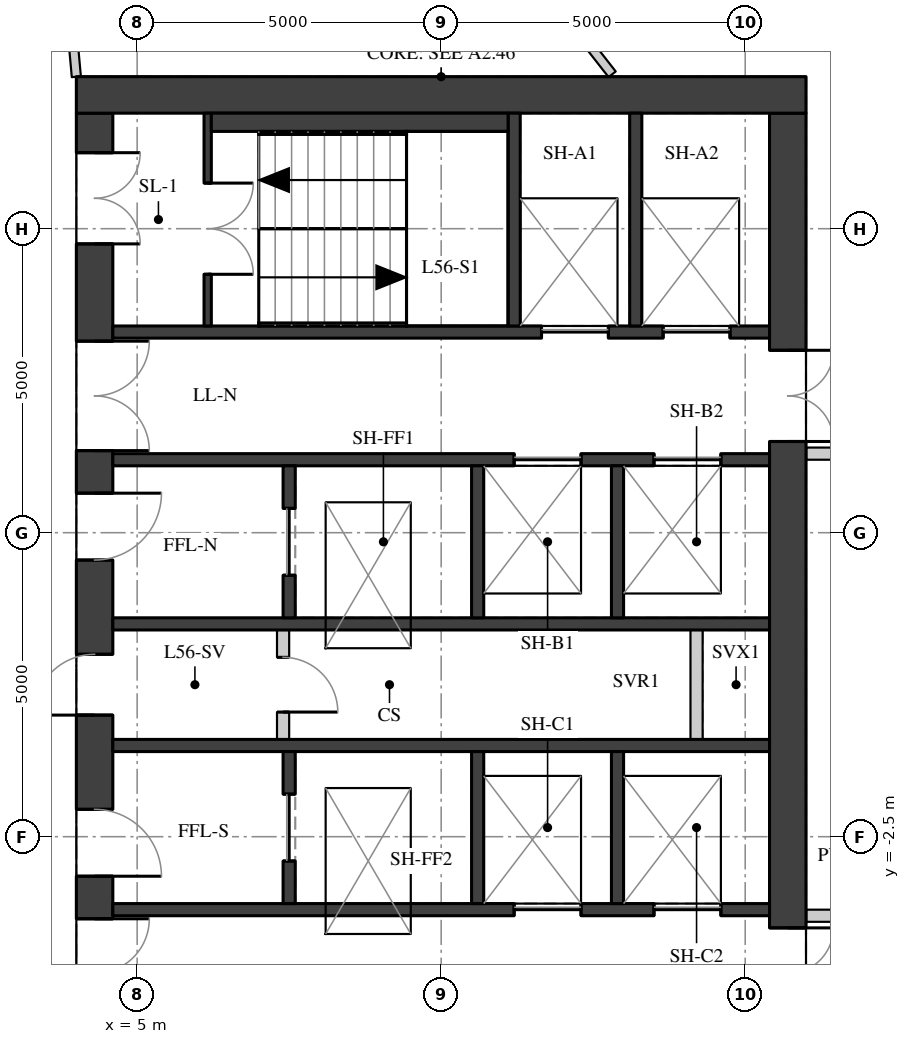
"""IFC4 building model, lengths in metres.
Left out: names, types, materials, properties, quantities, classifications, styles, units other than length and angle.
Written with IfcOpenShell. Run it as: python <this file> out.ifc"""

import sys

from ifc_helpers import new_model, si_unit, direction, frame, frame_2d, origin, place, context, subcontext, project, spatial, rectangle, extrude, element, fill, save


model = new_model("IFC4")
c1 = context("Model", 3, precision=1e-05, world=origin(), true_north=direction((0.0, 1.0)))
c2 = subcontext(c1, "Body", "Model", "MODEL_VIEW")
j1 = project(units=[si_unit("LENGTHUNIT", "METRE"), si_unit("PLANEANGLEUNIT", "RADIAN")], contexts=[c1])
p1 = place(None, origin())
s1 = spatial("IfcSite", under=j1, at=p1, CompositionType="ELEMENT")
p2 = place(p1, origin())
s2 = spatial("IfcBuilding", under=s1, at=p2, CompositionType="ELEMENT")
p3 = place(p2, frame((0.0, 0.0, 199.1)))
s3 = spatial("IfcBuildingStorey", under=s2, at=p3, CompositionType="ELEMENT", Elevation=199.1)
p4 = place(p3, frame((4.3, -9.4, 0.0), z_axis=(0.0, 0.0, 1.0), x_axis=(0.0, 1.0, 0.0)))
e1 = element("IfcWall", 1, at=p4, inside=s3, PredefinedType="SHEAR", context=c2, shape_type="SweptSolid", body=[
    extrude(rectangle(XDim=18.8, YDim=0.6, at=frame_2d((9.4, 0.0))), origin(), (0.0, 0.0, 1.0), 3.02),
])
p5 = place(p4, frame((0.65, 0.0, 0.0)))
e2 = element("IfcOpeningElement", 2, at=p5, cuts=e1, PredefinedType="OPENING", context=c2, shape_type="SweptSolid", body=[
    extrude(rectangle(XDim=1.5, YDim=2.1, at=frame_2d((0.75, 1.05))), frame((0.0, 0.31, 0.0), z_axis=(0.0, -1.0, 0.0), x_axis=(1.0, 0.0, 0.0)), (0.0, 0.0, 1.0), 0.62),
])
p6 = place(p4, frame((3.75, 0.0, 0.0)))
e3 = element("IfcOpeningElement", 3, at=p6, cuts=e1, PredefinedType="OPENING", context=c2, shape_type="SweptSolid", body=[
    extrude(rectangle(XDim=1.8, YDim=2.1, at=frame_2d((0.9, 1.05))), frame((0.0, 0.31, 0.0), z_axis=(0.0, -1.0, 0.0), x_axis=(1.0, 0.0, 0.0)), (0.0, 0.0, 1.0), 0.62),
])
p7 = place(p4, frame((6.25, 0.0, 0.0)))
e4 = element("IfcOpeningElement", 4, at=p7, cuts=e1, PredefinedType="OPENING", context=c2, shape_type="SweptSolid", body=[
    extrude(rectangle(XDim=1.1, YDim=2.1, at=frame_2d((0.55, 1.05))), frame((0.0, 0.31, 0.0), z_axis=(0.0, -1.0, 0.0), x_axis=(1.0, 0.0, 0.0)), (0.0, 0.0, 1.0), 0.62),
])
p8 = place(p4, frame((8.9, 0.0, 0.0)))
e5 = element("IfcOpeningElement", 5, at=p8, cuts=e1, PredefinedType="OPENING", context=c2, shape_type="SweptSolid", body=[
    extrude(rectangle(XDim=1.0, YDim=2.1, at=frame_2d((0.5, 1.05))), frame((0.0, 0.31, 0.0), z_axis=(0.0, -1.0, 0.0), x_axis=(1.0, 0.0, 0.0)), (0.0, 0.0, 1.0), 0.62),
])
p9 = place(p4, frame((11.45, 0.0, 0.0)))
e6 = element("IfcOpeningElement", 6, at=p9, cuts=e1, PredefinedType="OPENING", context=c2, shape_type="SweptSolid", body=[
    extrude(rectangle(XDim=1.1, YDim=2.1, at=frame_2d((0.55, 1.05))), frame((0.0, 0.31, 0.0), z_axis=(0.0, -1.0, 0.0), x_axis=(1.0, 0.0, 0.0)), (0.0, 0.0, 1.0), 0.62),
])
p10 = place(p4, frame((13.25, 0.0, 0.0)))
e7 = element("IfcOpeningElement", 7, at=p10, cuts=e1, PredefinedType="OPENING", context=c2, shape_type="SweptSolid", body=[
    extrude(rectangle(XDim=1.8, YDim=2.1, at=frame_2d((0.9, 1.05))), frame((0.0, 0.31, 0.0), z_axis=(0.0, -1.0, 0.0), x_axis=(1.0, 0.0, 0.0)), (0.0, 0.0, 1.0), 0.62),
])
p11 = place(p4, frame((16.65, 0.0, 0.0)))
e8 = element("IfcOpeningElement", 8, at=p11, cuts=e1, PredefinedType="OPENING", context=c2, shape_type="SweptSolid", body=[
    extrude(rectangle(XDim=1.5, YDim=2.1, at=frame_2d((0.75, 1.05))), frame((0.0, 0.31, 0.0), z_axis=(0.0, -1.0, 0.0), x_axis=(1.0, 0.0, 0.0)), (0.0, 0.0, 1.0), 0.62),
])
p12 = place(p3, frame((15.7, -9.4, 0.0), z_axis=(0.0, 0.0, 1.0), x_axis=(0.0, 1.0, 0.0)))
e9 = element("IfcWall", 9, at=p12, inside=s3, PredefinedType="SHEAR", context=c2, shape_type="SweptSolid", body=[
    extrude(rectangle(XDim=18.8, YDim=0.6, at=frame_2d((9.4, 0.0))), origin(), (0.0, 0.0, 1.0), 3.02),
])
p13 = place(p12, frame((13.4, 0.0, 0.0)))
e10 = element("IfcOpeningElement", 10, at=p13, cuts=e9, PredefinedType="OPENING", context=c2, shape_type="SweptSolid", body=[
    extrude(rectangle(XDim=1.5, YDim=2.1, at=frame_2d((0.75, 1.05))), frame((0.0, 0.31, 0.0), z_axis=(0.0, -1.0, 0.0), x_axis=(1.0, 0.0, 0.0)), (0.0, 0.0, 1.0), 0.62),
])
p14 = place(p12, frame((3.9, 0.0, 0.0)))
e11 = element("IfcOpeningElement", 11, at=p14, cuts=e9, PredefinedType="OPENING", context=c2, shape_type="SweptSolid", body=[
    extrude(rectangle(XDim=1.5, YDim=2.1, at=frame_2d((0.75, 1.05))), frame((0.0, 0.31, 0.0), z_axis=(0.0, -1.0, 0.0), x_axis=(1.0, 0.0, 0.0)), (0.0, 0.0, 1.0), 0.62),
])
p15 = place(p3, frame((4.0, 9.7, 0.0), z_axis=(0.0, 0.0, 1.0), x_axis=(1.0, 0.0, 0.0)))
e12 = element("IfcWall", 12, at=p15, inside=s3, PredefinedType="SHEAR", context=c2, shape_type="SweptSolid", body=[
    extrude(rectangle(XDim=12.0, YDim=0.6, at=frame_2d((6.0, 0.0))), origin(), (0.0, 0.0, 1.0), 3.02),
])
p16 = place(p3, frame((4.6, 5.8, 0.0), z_axis=(0.0, 0.0, 1.0), x_axis=(1.0, 0.0, 0.0)))
e13 = element("IfcWall", 13, at=p16, inside=s3, PredefinedType="SHEAR", context=c2, shape_type="SweptSolid", body=[
    extrude(rectangle(XDim=10.8, YDim=0.2, at=frame_2d((5.4, 0.0))), origin(), (0.0, 0.0, 1.0), 3.02),
])
p17 = place(p16, frame((7.05, 0.0, 0.0)))
e14 = element("IfcOpeningElement", 14, at=p17, cuts=e13, PredefinedType="OPENING", context=c2, shape_type="SweptSolid", body=[
    extrude(rectangle(XDim=1.1, YDim=2.1, at=frame_2d((0.55, 1.05))), frame((0.0, 0.11, 0.0), z_axis=(0.0, -1.0, 0.0), x_axis=(1.0, 0.0, 0.0)), (0.0, 0.0, 1.0), 0.22),
])
p18 = place(p16, frame((9.05, 0.0, 0.0)))
e15 = element("IfcOpeningElement", 15, at=p18, cuts=e13, PredefinedType="OPENING", context=c2, shape_type="SweptSolid", body=[
    extrude(rectangle(XDim=1.1, YDim=2.1, at=frame_2d((0.55, 1.05))), frame((0.0, 0.11, 0.0), z_axis=(0.0, -1.0, 0.0), x_axis=(1.0, 0.0, 0.0)), (0.0, 0.0, 1.0), 0.22),
])
p19 = place(p3, frame((4.6, 3.7, 0.0), z_axis=(0.0, 0.0, 1.0), x_axis=(1.0, 0.0, 0.0)))
e16 = element("IfcWall", 16, at=p19, inside=s3, PredefinedType="SHEAR", context=c2, shape_type="SweptSolid", body=[
    extrude(rectangle(XDim=10.8, YDim=0.2, at=frame_2d((5.4, 0.0))), origin(), (0.0, 0.0, 1.0), 3.02),
])
p20 = place(p19, frame((6.6, 0.0, 0.0)))
e17 = element("IfcOpeningElement", 17, at=p20, cuts=e16, PredefinedType="OPENING", context=c2, shape_type="SweptSolid", body=[
    extrude(rectangle(XDim=1.1, YDim=2.1, at=frame_2d((0.55, 1.05))), frame((0.0, 0.11, 0.0), z_axis=(0.0, -1.0, 0.0), x_axis=(1.0, 0.0, 0.0)), (0.0, 0.0, 1.0), 0.22),
])
p21 = place(p19, frame((8.9, 0.0, 0.0)))
e18 = element("IfcOpeningElement", 18, at=p21, cuts=e16, PredefinedType="OPENING", context=c2, shape_type="SweptSolid", body=[
    extrude(rectangle(XDim=1.1, YDim=2.1, at=frame_2d((0.55, 1.05))), frame((0.0, 0.11, 0.0), z_axis=(0.0, -1.0, 0.0), x_axis=(1.0, 0.0, 0.0)), (0.0, 0.0, 1.0), 0.22),
])
for number, where, z_axis, x_axis in (
    (19, (4.6, 1.0, 0.0), (0.0, 0.0, 1.0), (1.0, 0.0, 0.0)),
    (20, (4.6, -1.0, 0.0), (0.0, 0.0, 1.0), (1.0, 0.0, 0.0)),
):
    element("IfcWall", number, at=place(p3, frame(where, z_axis=z_axis, x_axis=x_axis)), inside=s3, PredefinedType="SHEAR", context=c2, shape_type="SweptSolid", body=[
        extrude(rectangle(XDim=10.8, YDim=0.2, at=frame_2d((5.4, 0.0))), origin(), (0.0, 0.0, 1.0), 3.02),
    ])
p22 = place(p3, frame((4.6, -3.7, 0.0), z_axis=(0.0, 0.0, 1.0), x_axis=(1.0, 0.0, 0.0)))
e21 = element("IfcWall", 21, at=p22, inside=s3, PredefinedType="SHEAR", context=c2, shape_type="SweptSolid", body=[
    extrude(rectangle(XDim=10.8, YDim=0.2, at=frame_2d((5.4, 0.0))), origin(), (0.0, 0.0, 1.0), 3.02),
])
p23 = place(p22, frame((6.6, 0.0, 0.0)))
e22 = element("IfcOpeningElement", 22, at=p23, cuts=e21, PredefinedType="OPENING", context=c2, shape_type="SweptSolid", body=[
    extrude(rectangle(XDim=1.1, YDim=2.1, at=frame_2d((0.55, 1.05))), frame((0.0, 0.11, 0.0), z_axis=(0.0, -1.0, 0.0), x_axis=(1.0, 0.0, 0.0)), (0.0, 0.0, 1.0), 0.22),
])
p24 = place(p22, frame((8.9, 0.0, 0.0)))
e23 = element("IfcOpeningElement", 23, at=p24, cuts=e21, PredefinedType="OPENING", context=c2, shape_type="SweptSolid", body=[
    extrude(rectangle(XDim=1.1, YDim=2.1, at=frame_2d((0.55, 1.05))), frame((0.0, 0.11, 0.0), z_axis=(0.0, -1.0, 0.0), x_axis=(1.0, 0.0, 0.0)), (0.0, 0.0, 1.0), 0.22),
])
for number, where, z_axis, x_axis in (
    (24, (11.2, 5.9, 0.0), (0.0, 0.0, 1.0), (0.0, 1.0, 0.0)),
    (25, (13.2, 5.9, 0.0), (0.0, 0.0, 1.0), (0.0, 1.0, 0.0)),
):
    element("IfcWall", number, at=place(p3, frame(where, z_axis=z_axis, x_axis=x_axis)), inside=s3, PredefinedType="SHEAR", context=c2, shape_type="SweptSolid", body=[
        extrude(rectangle(XDim=3.5, YDim=0.2, at=frame_2d((1.75, 0.0))), origin(), (0.0, 0.0, 1.0), 3.02),
    ])
p25 = place(p3, frame((7.5, 1.1, 0.0), z_axis=(0.0, 0.0, 1.0), x_axis=(0.0, 1.0, 0.0)))
e26 = element("IfcWall", 26, at=p25, inside=s3, PredefinedType="SHEAR", context=c2, shape_type="SweptSolid", body=[
    extrude(rectangle(XDim=2.5, YDim=0.2, at=frame_2d((1.25, 0.0))), origin(), (0.0, 0.0, 1.0), 3.02),
])
p26 = place(p25, frame((0.7, 0.0, 0.0)))
e27 = element("IfcOpeningElement", 27, at=p26, cuts=e26, PredefinedType="OPENING", context=c2, shape_type="SweptSolid", body=[
    extrude(rectangle(XDim=1.1, YDim=2.1, at=frame_2d((0.55, 1.05))), frame((0.0, 0.11, 0.0), z_axis=(0.0, -1.0, 0.0), x_axis=(1.0, 0.0, 0.0)), (0.0, 0.0, 1.0), 0.22),
])
p27 = place(p3, frame((7.5, -3.6, 0.0), z_axis=(0.0, 0.0, 1.0), x_axis=(0.0, 1.0, 0.0)))
e28 = element("IfcWall", 28, at=p27, inside=s3, PredefinedType="SHEAR", context=c2, shape_type="SweptSolid", body=[
    extrude(rectangle(XDim=2.5, YDim=0.2, at=frame_2d((1.25, 0.0))), origin(), (0.0, 0.0, 1.0), 3.02),
])
p28 = place(p27, frame((0.7, 0.0, 0.0)))
e29 = element("IfcOpeningElement", 29, at=p28, cuts=e28, PredefinedType="OPENING", context=c2, shape_type="SweptSolid", body=[
    extrude(rectangle(XDim=1.1, YDim=2.1, at=frame_2d((0.55, 1.05))), frame((0.0, 0.11, 0.0), z_axis=(0.0, -1.0, 0.0), x_axis=(1.0, 0.0, 0.0)), (0.0, 0.0, 1.0), 0.22),
])
for number, where, z_axis, x_axis in (
    (30, (10.6, 1.1, 0.0), (0.0, 0.0, 1.0), (0.0, 1.0, 0.0)),
    (31, (10.6, -3.6, 0.0), (0.0, 0.0, 1.0), (0.0, 1.0, 0.0)),
    (32, (12.9, 1.1, 0.0), (0.0, 0.0, 1.0), (0.0, 1.0, 0.0)),
    (33, (12.9, -3.6, 0.0), (0.0, 0.0, 1.0), (0.0, 1.0, 0.0)),
):
    element("IfcWall", number, at=place(p3, frame(where, z_axis=z_axis, x_axis=x_axis)), inside=s3, PredefinedType="SHEAR", context=c2, shape_type="SweptSolid", body=[
        extrude(rectangle(XDim=2.5, YDim=0.2, at=frame_2d((1.25, 0.0))), origin(), (0.0, 0.0, 1.0), 3.02),
    ])
p29 = place(p3, frame((6.16, 5.9, 0.0), z_axis=(0.0, 0.0, 1.0), x_axis=(0.0, 1.0, 0.0)))
e34 = element("IfcWall", 34, at=p29, inside=s3, PredefinedType="SHEAR", context=c2, shape_type="SweptSolid", body=[
    extrude(rectangle(XDim=3.5, YDim=0.12, at=frame_2d((1.75, 0.0))), origin(), (0.0, 0.0, 1.0), 3.02),
])
p30 = place(p29, frame((0.85, 0.0, 0.0)))
e35 = element("IfcOpeningElement", 35, at=p30, cuts=e34, PredefinedType="OPENING", context=c2, shape_type="SweptSolid", body=[
    extrude(rectangle(XDim=1.5, YDim=2.1, at=frame_2d((0.75, 1.05))), frame((0.0, 0.07, 0.0), z_axis=(0.0, -1.0, 0.0), x_axis=(1.0, 0.0, 0.0)), (0.0, 0.0, 1.0), 0.14),
])
p31 = place(p3, frame((7.4, -0.9, 0.0), z_axis=(0.0, 0.0, 1.0), x_axis=(0.0, 1.0, 0.0)))
e36 = element("IfcWall", 36, at=p31, inside=s3, PredefinedType="PARTITIONING", context=c2, shape_type="SweptSolid", body=[
    extrude(rectangle(XDim=1.8, YDim=0.2, at=frame_2d((0.9, 0.0))), origin(), (0.0, 0.0, 1.0), 3.02),
])
p32 = place(p31, frame((0.45, 0.0, 0.0)))
e37 = element("IfcOpeningElement", 37, at=p32, cuts=e36, PredefinedType="OPENING", context=c2, shape_type="SweptSolid", body=[
    extrude(rectangle(XDim=0.9, YDim=2.1, at=frame_2d((0.45, 1.05))), frame((0.0, 0.11, 0.0), z_axis=(0.0, -1.0, 0.0), x_axis=(1.0, 0.0, 0.0)), (0.0, 0.0, 1.0), 0.22),
])
p33 = place(p3, frame((14.2, -0.9, 0.0), z_axis=(0.0, 0.0, 1.0), x_axis=(0.0, 1.0, 0.0)))
e38 = element("IfcWall", 38, at=p33, inside=s3, PredefinedType="PARTITIONING", context=c2, shape_type="SweptSolid", body=[
    extrude(rectangle(XDim=1.8, YDim=0.2, at=frame_2d((0.9, 0.0))), origin(), (0.0, 0.0, 1.0), 3.02),
])
p34 = place(p3, frame((6.22, 9.25, 0.0), z_axis=(0.0, 0.0, 1.0), x_axis=(1.0, 0.0, 0.0)))
e39 = element("IfcWall", 39, at=p34, inside=s3, PredefinedType="PARTITIONING", context=c2, shape_type="SweptSolid", body=[
    extrude(rectangle(XDim=4.88, YDim=0.3, at=frame_2d((2.44, 0.0))), origin(), (0.0, 0.0, 1.0), 3.02),
])
p35 = place(p3, frame((17.6, 3.8, 0.0), z_axis=(0.0, 0.0, 1.0), x_axis=(-1.0, 0.0, 0.0)))
e40 = element("IfcWall", 40, at=p35, inside=s3, PredefinedType="PARTITIONING", context=c2, shape_type="SweptSolid", body=[
    extrude(rectangle(XDim=1.596, YDim=0.2, at=frame_2d((0.798, 0.0))), origin(), (0.0, 0.0, 1.0), 3.02),
])
p36 = place(p3, frame((16.004, -3.8, 0.0), z_axis=(0.0, 0.0, 1.0), x_axis=(1.0, 0.0, 0.0)))
e41 = element("IfcWall", 41, at=p36, inside=s3, PredefinedType="PARTITIONING", context=c2, shape_type="SweptSolid", body=[
    extrude(rectangle(XDim=1.596, YDim=0.2, at=frame_2d((0.798, 0.0))), origin(), (0.0, 0.0, 1.0), 2.47),
])
p37 = place(p3, frame((4.0, 9.999, 0.0), z_axis=(0.0, 0.0, 1.0), x_axis=(-0.090475982725, 0.995898637689, 0.0)))
e42 = element("IfcWall", 42, at=p37, inside=s3, PredefinedType="PARTITIONING", context=c2, shape_type="SweptSolid", body=[
    extrude(rectangle(XDim=2.21, YDim=0.15, at=frame_2d((1.105, 0.0))), origin(), (0.0, 0.0, 1.0), 3.02),
])
p38 = place(p3, frame((11.81, 11.321, 0.0), z_axis=(0.0, 0.0, 1.0), x_axis=(0.615964296608, -0.787774069962, 0.0)))
e43 = element("IfcWall", 43, at=p38, inside=s3, PredefinedType="PARTITIONING", context=c2, shape_type="SweptSolid", body=[
    extrude(rectangle(XDim=1.627, YDim=0.15, at=frame_2d((0.813, 0.0))), origin(), (0.0, 0.0, 1.0), 3.02),
])
p39 = place(p6, origin())
e44 = element("IfcDoor", 44, at=p39, inside=s3, OperationType="DOUBLE_DOOR_SINGLE_SWING", PredefinedType="DOOR", context=c2, shape_type="SweptSolid", body=[
    extrude(rectangle(XDim=1.8, YDim=2.1, at=frame_2d((0.9, 1.05))), frame((0.0, 0.025, 0.0), z_axis=(0.0, -1.0, 0.0), x_axis=(1.0, 0.0, 0.0)), (0.0, 0.0, 1.0), 0.05),
])
fill(e3, e44)
p40 = place(p7, origin())
e45 = element("IfcDoor", 45, at=p40, inside=s3, OperationType="SINGLE_SWING_RIGHT", PredefinedType="DOOR", context=c2, shape_type="SweptSolid", body=[
    extrude(rectangle(XDim=1.1, YDim=2.1, at=frame_2d((0.55, 1.05))), frame((0.0, 0.025, 0.0), z_axis=(0.0, -1.0, 0.0), x_axis=(1.0, 0.0, 0.0)), (0.0, 0.0, 1.0), 0.05),
])
fill(e4, e45)
p41 = place(p8, origin())
e46 = element("IfcDoor", 46, at=p41, inside=s3, OperationType="SINGLE_SWING_LEFT", PredefinedType="DOOR", context=c2, shape_type="SweptSolid", body=[
    extrude(rectangle(XDim=1.0, YDim=2.1, at=frame_2d((0.5, 1.05))), frame((0.0, 0.025, 0.0), z_axis=(0.0, -1.0, 0.0), x_axis=(1.0, 0.0, 0.0)), (0.0, 0.0, 1.0), 0.05),
])
fill(e5, e46)
p42 = place(p9, origin())
e47 = element("IfcDoor", 47, at=p42, inside=s3, OperationType="SINGLE_SWING_LEFT", PredefinedType="DOOR", context=c2, shape_type="SweptSolid", body=[
    extrude(rectangle(XDim=1.1, YDim=2.1, at=frame_2d((0.55, 1.05))), frame((0.0, 0.025, 0.0), z_axis=(0.0, -1.0, 0.0), x_axis=(1.0, 0.0, 0.0)), (0.0, 0.0, 1.0), 0.05),
])
fill(e6, e47)
p43 = place(p10, origin())
e48 = element("IfcDoor", 48, at=p43, inside=s3, OperationType="DOUBLE_DOOR_SINGLE_SWING", PredefinedType="DOOR", context=c2, shape_type="SweptSolid", body=[
    extrude(rectangle(XDim=1.8, YDim=2.1, at=frame_2d((0.9, 1.05))), frame((0.0, 0.025, 0.0), z_axis=(0.0, -1.0, 0.0), x_axis=(1.0, 0.0, 0.0)), (0.0, 0.0, 1.0), 0.05),
])
fill(e7, e48)
p44 = place(p11, origin())
e49 = element("IfcDoor", 49, at=p44, inside=s3, OperationType="DOUBLE_DOOR_SINGLE_SWING", PredefinedType="DOOR", context=c2, shape_type="SweptSolid", body=[
    extrude(rectangle(XDim=1.5, YDim=2.1, at=frame_2d((0.75, 1.05))), frame((0.0, 0.025, 0.0), z_axis=(0.0, -1.0, 0.0), x_axis=(1.0, 0.0, 0.0)), (0.0, 0.0, 1.0), 0.05),
])
fill(e8, e49)
p45 = place(p13, origin())
e50 = element("IfcDoor", 50, at=p45, inside=s3, OperationType="DOUBLE_DOOR_SINGLE_SWING", PredefinedType="DOOR", context=c2, shape_type="SweptSolid", body=[
    extrude(rectangle(XDim=1.5, YDim=2.1, at=frame_2d((0.75, 1.05))), frame((0.0, 0.025, 0.0), z_axis=(0.0, -1.0, 0.0), x_axis=(1.0, 0.0, 0.0)), (0.0, 0.0, 1.0), 0.05),
])
fill(e10, e50)
p46 = place(p14, origin())
e51 = element("IfcDoor", 51, at=p46, inside=s3, OperationType="DOUBLE_DOOR_SINGLE_SWING", PredefinedType="DOOR", context=c2, shape_type="SweptSolid", body=[
    extrude(rectangle(XDim=1.5, YDim=2.1, at=frame_2d((0.75, 1.05))), frame((0.0, 0.025, 0.0), z_axis=(0.0, -1.0, 0.0), x_axis=(1.0, 0.0, 0.0)), (0.0, 0.0, 1.0), 0.05),
])
fill(e11, e51)
p47 = place(p30, origin())
e52 = element("IfcDoor", 52, at=p47, inside=s3, OperationType="DOUBLE_DOOR_SINGLE_SWING", PredefinedType="DOOR", context=c2, shape_type="SweptSolid", body=[
    extrude(rectangle(XDim=1.5, YDim=2.1, at=frame_2d((0.75, 1.05))), frame((0.0, 0.025, 0.0), z_axis=(0.0, -1.0, 0.0), x_axis=(1.0, 0.0, 0.0)), (0.0, 0.0, 1.0), 0.05),
])
fill(e35, e52)
p48 = place(p17, origin())
e53 = element("IfcDoor", 53, at=p48, inside=s3, OperationType="DOUBLE_DOOR_SLIDING", PredefinedType="DOOR", context=c2, shape_type="SweptSolid", body=[
    extrude(rectangle(XDim=1.1, YDim=2.1, at=frame_2d((0.55, 1.05))), frame((0.0, 0.025, 0.0), z_axis=(0.0, -1.0, 0.0), x_axis=(1.0, 0.0, 0.0)), (0.0, 0.0, 1.0), 0.05),
])
fill(e14, e53)
p49 = place(p18, origin())
e54 = element("IfcDoor", 54, at=p49, inside=s3, OperationType="DOUBLE_DOOR_SLIDING", PredefinedType="DOOR", context=c2, shape_type="SweptSolid", body=[
    extrude(rectangle(XDim=1.1, YDim=2.1, at=frame_2d((0.55, 1.05))), frame((0.0, 0.025, 0.0), z_axis=(0.0, -1.0, 0.0), x_axis=(1.0, 0.0, 0.0)), (0.0, 0.0, 1.0), 0.05),
])
fill(e15, e54)
p50 = place(p20, origin())
e55 = element("IfcDoor", 55, at=p50, inside=s3, OperationType="DOUBLE_DOOR_SLIDING", PredefinedType="DOOR", context=c2, shape_type="SweptSolid", body=[
    extrude(rectangle(XDim=1.1, YDim=2.1, at=frame_2d((0.55, 1.05))), frame((0.0, 0.025, 0.0), z_axis=(0.0, -1.0, 0.0), x_axis=(1.0, 0.0, 0.0)), (0.0, 0.0, 1.0), 0.05),
])
fill(e17, e55)
p51 = place(p21, origin())
e56 = element("IfcDoor", 56, at=p51, inside=s3, OperationType="DOUBLE_DOOR_SLIDING", PredefinedType="DOOR", context=c2, shape_type="SweptSolid", body=[
    extrude(rectangle(XDim=1.1, YDim=2.1, at=frame_2d((0.55, 1.05))), frame((0.0, 0.025, 0.0), z_axis=(0.0, -1.0, 0.0), x_axis=(1.0, 0.0, 0.0)), (0.0, 0.0, 1.0), 0.05),
])
fill(e18, e56)
p52 = place(p23, origin())
e57 = element("IfcDoor", 57, at=p52, inside=s3, OperationType="DOUBLE_DOOR_SLIDING", PredefinedType="DOOR", context=c2, shape_type="SweptSolid", body=[
    extrude(rectangle(XDim=1.1, YDim=2.1, at=frame_2d((0.55, 1.05))), frame((0.0, 0.025, 0.0), z_axis=(0.0, -1.0, 0.0), x_axis=(1.0, 0.0, 0.0)), (0.0, 0.0, 1.0), 0.05),
])
fill(e22, e57)
p53 = place(p24, origin())
e58 = element("IfcDoor", 58, at=p53, inside=s3, OperationType="DOUBLE_DOOR_SLIDING", PredefinedType="DOOR", context=c2, shape_type="SweptSolid", body=[
    extrude(rectangle(XDim=1.1, YDim=2.1, at=frame_2d((0.55, 1.05))), frame((0.0, 0.025, 0.0), z_axis=(0.0, -1.0, 0.0), x_axis=(1.0, 0.0, 0.0)), (0.0, 0.0, 1.0), 0.05),
])
fill(e23, e58)
p54 = place(p26, origin())
e59 = element("IfcDoor", 59, at=p54, inside=s3, OperationType="DOUBLE_DOOR_SLIDING", PredefinedType="DOOR", context=c2, shape_type="SweptSolid", body=[
    extrude(rectangle(XDim=1.1, YDim=2.1, at=frame_2d((0.55, 1.05))), frame((0.0, 0.025, 0.0), z_axis=(0.0, -1.0, 0.0), x_axis=(1.0, 0.0, 0.0)), (0.0, 0.0, 1.0), 0.05),
])
fill(e27, e59)
p55 = place(p28, origin())
e60 = element("IfcDoor", 60, at=p55, inside=s3, OperationType="DOUBLE_DOOR_SLIDING", PredefinedType="DOOR", context=c2, shape_type="SweptSolid", body=[
    extrude(rectangle(XDim=1.1, YDim=2.1, at=frame_2d((0.55, 1.05))), frame((0.0, 0.025, 0.0), z_axis=(0.0, -1.0, 0.0), x_axis=(1.0, 0.0, 0.0)), (0.0, 0.0, 1.0), 0.05),
])
fill(e29, e60)
p56 = place(p32, origin())
e61 = element("IfcDoor", 61, at=p56, inside=s3, OperationType="SINGLE_SWING_RIGHT", PredefinedType="DOOR", context=c2, shape_type="SweptSolid", body=[
    extrude(rectangle(XDim=0.9, YDim=2.1, at=frame_2d((0.45, 1.05))), frame((0.0, 0.025, 0.0), z_axis=(0.0, -1.0, 0.0), x_axis=(1.0, 0.0, 0.0)), (0.0, 0.0, 1.0), 0.05),
])
fill(e37, e61)
save(model, sys.argv[1])
